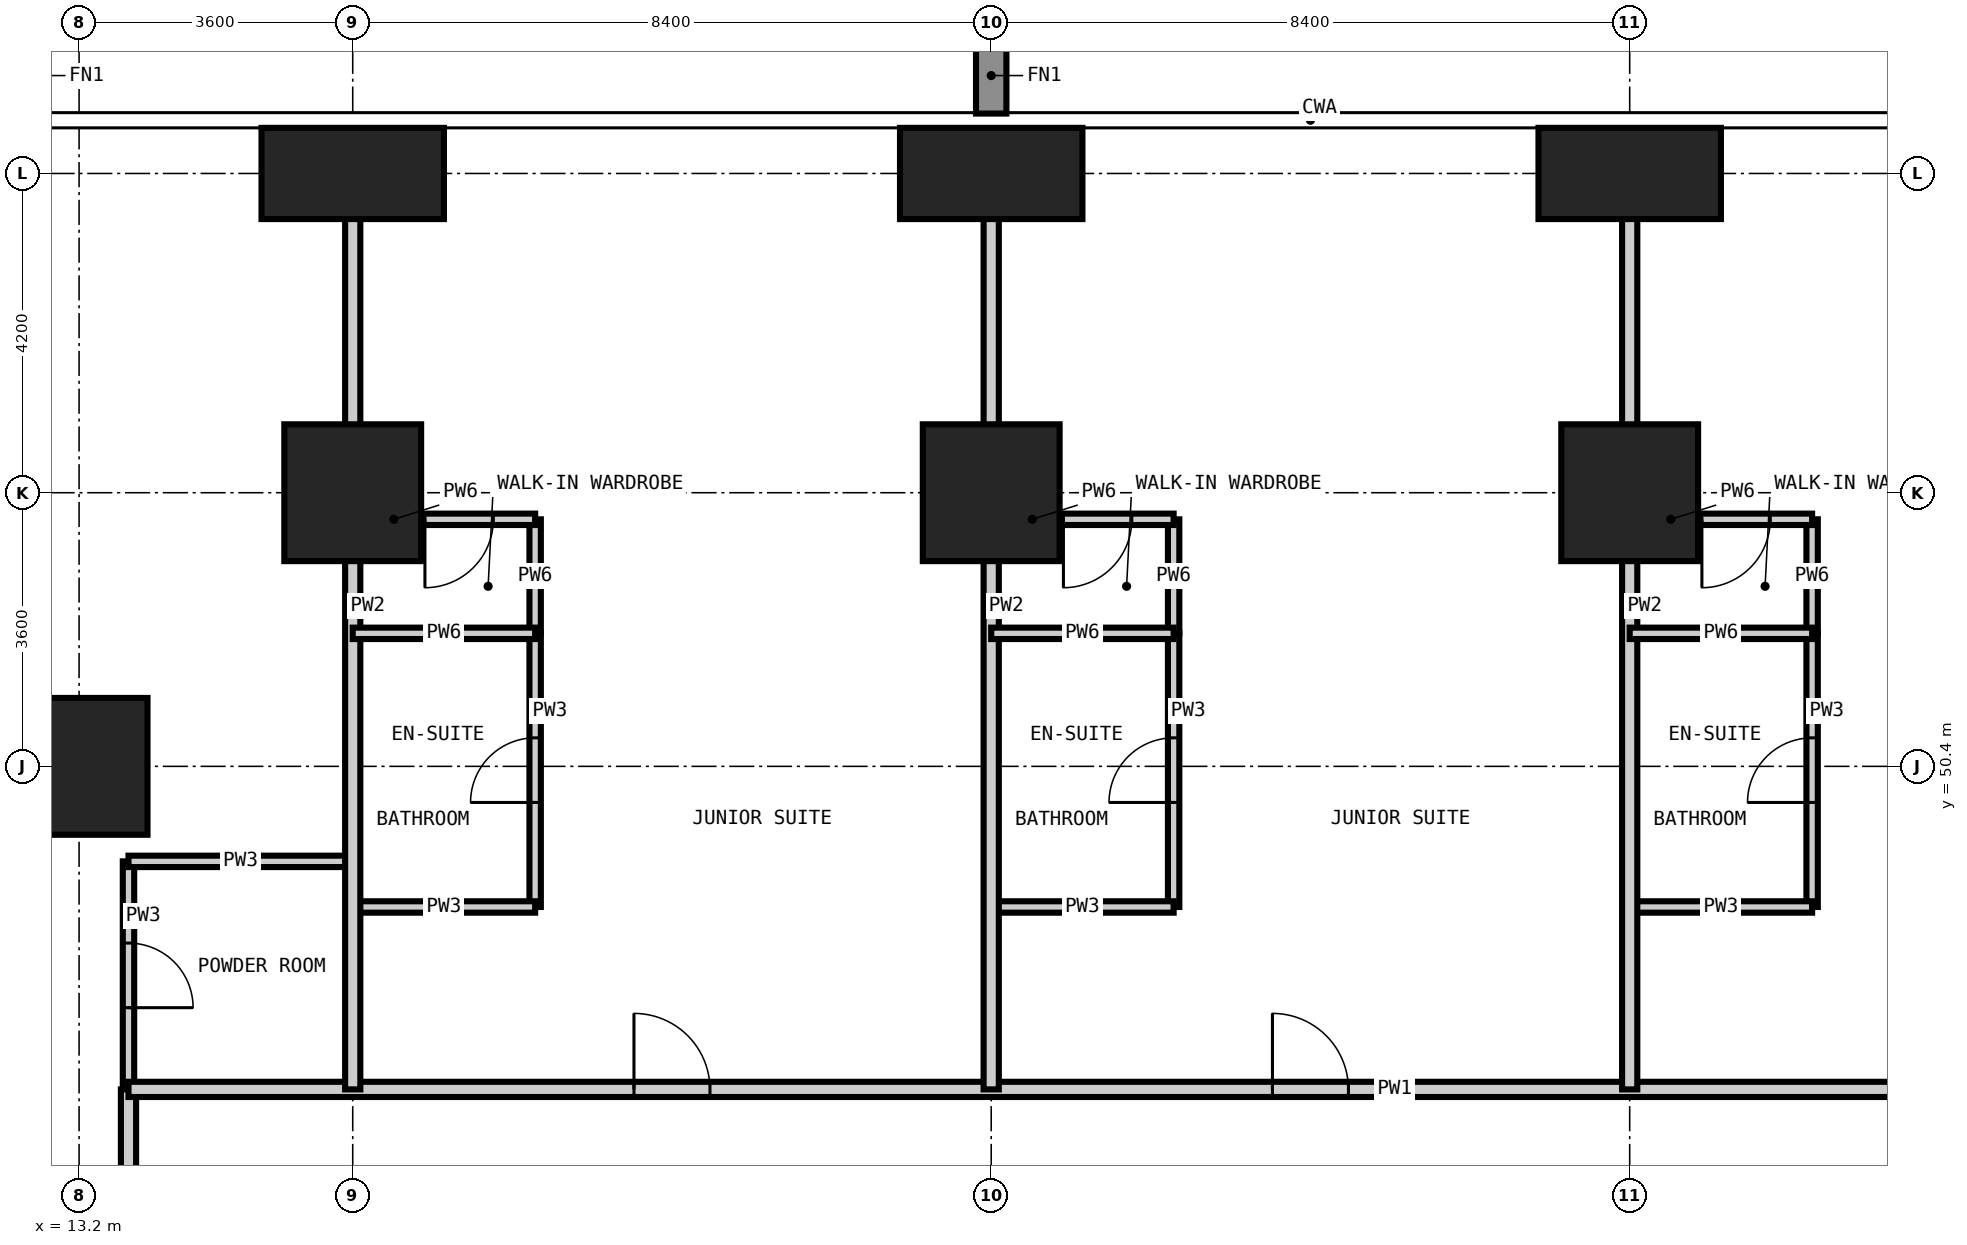
"""IFC4 building model, lengths in metres.
Left out: names, types, materials, properties, quantities, classifications, styles, units other than length and angle.
Written with IfcOpenShell. Run it as: python <this file> out.ifc"""

import sys

from ifc_helpers import new_model, si_unit, direction, frame, frame_2d, origin, origin_2d, place, context, subcontext, project, spatial, rectangle, extrude, element, fill, save


model = new_model("IFC4")
c1 = context("Model", 3, precision=1e-05, world=origin(), true_north=direction((0.0, 1.0)))
c2 = subcontext(c1, "Body", "Model", "MODEL_VIEW")
j1 = project(units=[si_unit("LENGTHUNIT", "METRE"), si_unit("PLANEANGLEUNIT", "RADIAN")], contexts=[c1])
p1 = place(None, origin())
s1 = spatial("IfcSite", under=j1, at=p1, CompositionType="ELEMENT")
p2 = place(p1, origin())
s2 = spatial("IfcBuilding", under=s1, at=p2, CompositionType="ELEMENT")
p3 = place(p2, frame((0.0, 0.0, 55.8)))
s3 = spatial("IfcBuildingStorey", under=s2, at=p3, CompositionType="ELEMENT", Elevation=55.8)
for number, where, z_axis, x_axis in (
    (1, (13.2, 50.4, -0.35), (0.0, 0.0, 1.0), (1.0, 0.0, 0.0)),
    (2, (16.8, 54.0, -0.35), (0.0, 0.0, 1.0), (1.0, 0.0, 0.0)),
):
    element("IfcColumn", number, at=place(p3, frame(where, z_axis=z_axis, x_axis=x_axis)), inside=s3, PredefinedType="COLUMN", context=c2, shape_type="SweptSolid", body=[
        extrude(rectangle(XDim=1.8, YDim=1.8, at=origin_2d()), origin(), (0.0, 0.0, 1.0), 3.6),
    ])
p4 = place(p3, frame((16.8, 58.2, -0.35), z_axis=(0.0, 0.0, 1.0), x_axis=(1.0, 0.0, 0.0)))
e3 = element("IfcColumn", 3, at=p4, inside=s3, PredefinedType="COLUMN", context=c2, shape_type="SweptSolid", body=[
    extrude(rectangle(XDim=2.4, YDim=1.2, at=origin_2d()), origin(), (0.0, 0.0, 1.0), 3.6),
])
p5 = place(p3, frame((25.2, 54.0, -0.35), z_axis=(0.0, 0.0, 1.0), x_axis=(1.0, 0.0, 0.0)))
e4 = element("IfcColumn", 4, at=p5, inside=s3, PredefinedType="COLUMN", context=c2, shape_type="SweptSolid", body=[
    extrude(rectangle(XDim=1.8, YDim=1.8, at=origin_2d()), origin(), (0.0, 0.0, 1.0), 3.6),
])
p6 = place(p3, frame((25.2, 58.2, -0.35), z_axis=(0.0, 0.0, 1.0), x_axis=(1.0, 0.0, 0.0)))
e5 = element("IfcColumn", 5, at=p6, inside=s3, PredefinedType="COLUMN", context=c2, shape_type="SweptSolid", body=[
    extrude(rectangle(XDim=2.4, YDim=1.2, at=origin_2d()), origin(), (0.0, 0.0, 1.0), 3.6),
])
p7 = place(p3, frame((33.6, 54.0, -0.35), z_axis=(0.0, 0.0, 1.0), x_axis=(1.0, 0.0, 0.0)))
e6 = element("IfcColumn", 6, at=p7, inside=s3, PredefinedType="COLUMN", context=c2, shape_type="SweptSolid", body=[
    extrude(rectangle(XDim=1.8, YDim=1.8, at=origin_2d()), origin(), (0.0, 0.0, 1.0), 3.6),
])
p8 = place(p3, frame((33.6, 58.2, -0.35), z_axis=(0.0, 0.0, 1.0), x_axis=(1.0, 0.0, 0.0)))
e7 = element("IfcColumn", 7, at=p8, inside=s3, PredefinedType="COLUMN", context=c2, shape_type="SweptSolid", body=[
    extrude(rectangle(XDim=2.4, YDim=1.2, at=origin_2d()), origin(), (0.0, 0.0, 1.0), 3.6),
])
p9 = place(p3, frame((13.85, 46.15, 0.0), z_axis=(0.0, 0.0, 1.0), x_axis=(0.0, 1.0, 0.0)))
e8 = element("IfcWall", 8, at=p9, inside=s3, PredefinedType="PARTITIONING", context=c2, shape_type="SweptSolid", body=[
    extrude(rectangle(XDim=3.0, YDim=0.15, at=frame_2d((1.5, 0.0))), origin(), (0.0, 0.0, 1.0), 3.25),
])
p10 = place(p9, frame((1.075, 0.0, 0.0)))
e9 = element("IfcOpeningElement", 9, at=p10, cuts=e8, PredefinedType="OPENING", context=c2, shape_type="SweptSolid", body=[
    extrude(rectangle(XDim=0.85, YDim=2.1, at=frame_2d((0.425, 1.05))), frame((0.0, 0.085, 0.0), z_axis=(0.0, -1.0, 0.0), x_axis=(1.0, 0.0, 0.0)), (0.0, 0.0, 1.0), 0.17),
])
p11 = place(p3, frame((19.2, 48.55, 0.0), z_axis=(0.0, 0.0, 1.0), x_axis=(0.0, 1.0, 0.0)))
e10 = element("IfcWall", 10, at=p11, inside=s3, PredefinedType="PARTITIONING", context=c2, shape_type="SweptSolid", body=[
    extrude(rectangle(XDim=3.6, YDim=0.15, at=frame_2d((1.8, 0.0))), origin(), (0.0, 0.0, 1.0), 3.25),
])
p12 = place(p11, frame((1.375, 0.0, 0.0)))
e11 = element("IfcOpeningElement", 11, at=p12, cuts=e10, PredefinedType="OPENING", context=c2, shape_type="SweptSolid", body=[
    extrude(rectangle(XDim=0.85, YDim=2.1, at=frame_2d((0.425, 1.05))), frame((0.0, 0.085, 0.0), z_axis=(0.0, -1.0, 0.0), x_axis=(1.0, 0.0, 0.0)), (0.0, 0.0, 1.0), 0.17),
])
p13 = place(p3, frame((27.6, 48.55, 0.0), z_axis=(0.0, 0.0, 1.0), x_axis=(0.0, 1.0, 0.0)))
e12 = element("IfcWall", 12, at=p13, inside=s3, PredefinedType="PARTITIONING", context=c2, shape_type="SweptSolid", body=[
    extrude(rectangle(XDim=3.6, YDim=0.15, at=frame_2d((1.8, 0.0))), origin(), (0.0, 0.0, 1.0), 3.25),
])
p14 = place(p13, frame((1.375, 0.0, 0.0)))
e13 = element("IfcOpeningElement", 13, at=p14, cuts=e12, PredefinedType="OPENING", context=c2, shape_type="SweptSolid", body=[
    extrude(rectangle(XDim=0.85, YDim=2.1, at=frame_2d((0.425, 1.05))), frame((0.0, 0.085, 0.0), z_axis=(0.0, -1.0, 0.0), x_axis=(1.0, 0.0, 0.0)), (0.0, 0.0, 1.0), 0.17),
])
p15 = place(p3, frame((36.0, 48.55, 0.0), z_axis=(0.0, 0.0, 1.0), x_axis=(0.0, 1.0, 0.0)))
e14 = element("IfcWall", 14, at=p15, inside=s3, PredefinedType="PARTITIONING", context=c2, shape_type="SweptSolid", body=[
    extrude(rectangle(XDim=3.6, YDim=0.15, at=frame_2d((1.8, 0.0))), origin(), (0.0, 0.0, 1.0), 3.25),
])
p16 = place(p15, frame((1.375, 0.0, 0.0)))
e15 = element("IfcOpeningElement", 15, at=p16, cuts=e14, PredefinedType="OPENING", context=c2, shape_type="SweptSolid", body=[
    extrude(rectangle(XDim=0.85, YDim=2.1, at=frame_2d((0.425, 1.05))), frame((0.0, 0.085, 0.0), z_axis=(0.0, -1.0, 0.0), x_axis=(1.0, 0.0, 0.0)), (0.0, 0.0, 1.0), 0.17),
])
p17 = place(p3, frame((16.8, 48.55, 0.0), z_axis=(0.0, 0.0, 1.0), x_axis=(1.0, 0.0, 0.0)))
e16 = element("IfcWall", 16, at=p17, inside=s3, PredefinedType="PARTITIONING", context=c2, shape_type="SweptSolid", body=[
    extrude(rectangle(XDim=2.4, YDim=0.15, at=frame_2d((1.2, 0.0))), origin(), (0.0, 0.0, 1.0), 3.25),
])
p18 = place(p3, frame((25.2, 48.55, 0.0), z_axis=(0.0, 0.0, 1.0), x_axis=(1.0, 0.0, 0.0)))
e17 = element("IfcWall", 17, at=p18, inside=s3, PredefinedType="PARTITIONING", context=c2, shape_type="SweptSolid", body=[
    extrude(rectangle(XDim=2.4, YDim=0.15, at=frame_2d((1.2, 0.0))), origin(), (0.0, 0.0, 1.0), 3.25),
])
p19 = place(p3, frame((33.6, 48.55, 0.0), z_axis=(0.0, 0.0, 1.0), x_axis=(1.0, 0.0, 0.0)))
e18 = element("IfcWall", 18, at=p19, inside=s3, PredefinedType="PARTITIONING", context=c2, shape_type="SweptSolid", body=[
    extrude(rectangle(XDim=2.4, YDim=0.15, at=frame_2d((1.2, 0.0))), origin(), (0.0, 0.0, 1.0), 3.25),
])
p20 = place(p3, frame((13.85, 49.15, 0.0), z_axis=(0.0, 0.0, 1.0), x_axis=(1.0, 0.0, 0.0)))
e19 = element("IfcWall", 19, at=p20, inside=s3, PredefinedType="PARTITIONING", context=c2, shape_type="SweptSolid", body=[
    extrude(rectangle(XDim=2.95, YDim=0.15, at=frame_2d((1.475, 0.0))), origin(), (0.0, 0.0, 1.0), 3.25),
])
p21 = place(p3, frame((13.85, 13.85, 0.0), z_axis=(0.0, 0.0, 1.0), x_axis=(0.0, 1.0, 0.0)))
e20 = element("IfcWall", 20, at=p21, inside=s3, PredefinedType="PARTITIONING", context=c2, shape_type="SweptSolid", body=[
    extrude(rectangle(XDim=32.3, YDim=0.2, at=frame_2d((16.15, 0.0))), origin(), (0.0, 0.0, 1.0), 3.25),
])
p22 = place(p21, frame((5.45, 0.0, 0.0)))
e21 = element("IfcOpeningElement", 21, at=p22, cuts=e20, PredefinedType="OPENING", context=c2, shape_type="SweptSolid", body=[
    extrude(rectangle(XDim=1.0, YDim=2.2, at=frame_2d((0.5, 1.1))), frame((0.0, 0.11, 0.0), z_axis=(0.0, -1.0, 0.0), x_axis=(1.0, 0.0, 0.0)), (0.0, 0.0, 1.0), 0.22),
])
p23 = place(p21, frame((13.85, 0.0, 0.0)))
e22 = element("IfcOpeningElement", 22, at=p23, cuts=e20, PredefinedType="OPENING", context=c2, shape_type="SweptSolid", body=[
    extrude(rectangle(XDim=1.0, YDim=2.2, at=frame_2d((0.5, 1.1))), frame((0.0, 0.11, 0.0), z_axis=(0.0, -1.0, 0.0), x_axis=(1.0, 0.0, 0.0)), (0.0, 0.0, 1.0), 0.22),
])
p24 = place(p21, frame((22.25, 0.0, 0.0)))
e23 = element("IfcOpeningElement", 23, at=p24, cuts=e20, PredefinedType="OPENING", context=c2, shape_type="SweptSolid", body=[
    extrude(rectangle(XDim=1.0, YDim=2.2, at=frame_2d((0.5, 1.1))), frame((0.0, 0.11, 0.0), z_axis=(0.0, -1.0, 0.0), x_axis=(1.0, 0.0, 0.0)), (0.0, 0.0, 1.0), 0.22),
])
p25 = place(p21, frame((0.975, 0.0, 0.0)))
e24 = element("IfcOpeningElement", 24, at=p25, cuts=e20, PredefinedType="OPENING", context=c2, shape_type="SweptSolid", body=[
    extrude(rectangle(XDim=1.0, YDim=2.2, at=frame_2d((0.5, 1.1))), frame((0.0, 0.11, 0.0), z_axis=(0.0, -1.0, 0.0), x_axis=(1.0, 0.0, 0.0)), (0.0, 0.0, 1.0), 0.22),
])
p26 = place(p21, frame((29.725, 0.0, 0.0)))
e25 = element("IfcOpeningElement", 25, at=p26, cuts=e20, PredefinedType="OPENING", context=c2, shape_type="SweptSolid", body=[
    extrude(rectangle(XDim=1.0, YDim=2.2, at=frame_2d((0.5, 1.1))), frame((0.0, 0.11, 0.0), z_axis=(0.0, -1.0, 0.0), x_axis=(1.0, 0.0, 0.0)), (0.0, 0.0, 1.0), 0.22),
])
p27 = place(p3, frame((13.85, 46.15, 0.0), z_axis=(0.0, 0.0, 1.0), x_axis=(1.0, 0.0, 0.0)))
e26 = element("IfcWall", 26, at=p27, inside=s3, PredefinedType="PARTITIONING", context=c2, shape_type="SweptSolid", body=[
    extrude(rectangle(XDim=31.7, YDim=0.2, at=frame_2d((15.85, 0.0))), origin(), (0.0, 0.0, 1.0), 3.25),
])
p28 = place(p27, frame((6.65, 0.0, 0.0)))
e27 = element("IfcOpeningElement", 27, at=p28, cuts=e26, PredefinedType="OPENING", context=c2, shape_type="SweptSolid", body=[
    extrude(rectangle(XDim=1.0, YDim=2.2, at=frame_2d((0.5, 1.1))), frame((0.0, 0.11, 0.0), z_axis=(0.0, -1.0, 0.0), x_axis=(1.0, 0.0, 0.0)), (0.0, 0.0, 1.0), 0.22),
])
p29 = place(p27, frame((15.05, 0.0, 0.0)))
e28 = element("IfcOpeningElement", 28, at=p29, cuts=e26, PredefinedType="OPENING", context=c2, shape_type="SweptSolid", body=[
    extrude(rectangle(XDim=1.0, YDim=2.2, at=frame_2d((0.5, 1.1))), frame((0.0, 0.11, 0.0), z_axis=(0.0, -1.0, 0.0), x_axis=(1.0, 0.0, 0.0)), (0.0, 0.0, 1.0), 0.22),
])
p30 = place(p27, frame((23.45, 0.0, 0.0)))
e29 = element("IfcOpeningElement", 29, at=p30, cuts=e26, PredefinedType="OPENING", context=c2, shape_type="SweptSolid", body=[
    extrude(rectangle(XDim=1.0, YDim=2.2, at=frame_2d((0.5, 1.1))), frame((0.0, 0.11, 0.0), z_axis=(0.0, -1.0, 0.0), x_axis=(1.0, 0.0, 0.0)), (0.0, 0.0, 1.0), 0.22),
])
for number, where, z_axis, x_axis in (
    (30, (16.8, 46.15, 0.0), (0.0, 0.0, 1.0), (0.0, 1.0, 0.0)),
    (31, (25.2, 46.15, 0.0), (0.0, 0.0, 1.0), (0.0, 1.0, 0.0)),
    (32, (33.6, 46.15, 0.0), (0.0, 0.0, 1.0), (0.0, 1.0, 0.0)),
):
    element("IfcWall", number, at=place(p3, frame(where, z_axis=z_axis, x_axis=x_axis)), inside=s3, PredefinedType="PARTITIONING", context=c2, shape_type="SweptSolid", body=[
        extrude(rectangle(XDim=12.658, YDim=0.2, at=frame_2d((6.329, 0.0))), origin(), (0.0, 0.0, 1.0), 3.25),
    ])
for number, where, z_axis, x_axis in (
    (33, (19.2, 52.15, 0.0), (0.0, 0.0, 1.0), (0.0, 1.0, 0.0)),
    (34, (27.6, 52.15, 0.0), (0.0, 0.0, 1.0), (0.0, 1.0, 0.0)),
    (35, (36.0, 52.15, 0.0), (0.0, 0.0, 1.0), (0.0, 1.0, 0.0)),
):
    element("IfcWall", number, at=place(p3, frame(where, z_axis=z_axis, x_axis=x_axis)), inside=s3, PredefinedType="PARTITIONING", context=c2, shape_type="SweptSolid", body=[
        extrude(rectangle(XDim=1.5, YDim=0.15, at=frame_2d((0.75, 0.0))), origin(), (0.0, 0.0, 1.0), 3.25),
    ])
p31 = place(p3, frame((16.8, 52.15, 0.0), z_axis=(0.0, 0.0, 1.0), x_axis=(1.0, 0.0, 0.0)))
e36 = element("IfcWall", 36, at=p31, inside=s3, PredefinedType="PARTITIONING", context=c2, shape_type="SweptSolid", body=[
    extrude(rectangle(XDim=2.4, YDim=0.15, at=frame_2d((1.2, 0.0))), origin(), (0.0, 0.0, 1.0), 3.25),
])
p32 = place(p3, frame((25.2, 52.15, 0.0), z_axis=(0.0, 0.0, 1.0), x_axis=(1.0, 0.0, 0.0)))
e37 = element("IfcWall", 37, at=p32, inside=s3, PredefinedType="PARTITIONING", context=c2, shape_type="SweptSolid", body=[
    extrude(rectangle(XDim=2.4, YDim=0.15, at=frame_2d((1.2, 0.0))), origin(), (0.0, 0.0, 1.0), 3.25),
])
p33 = place(p3, frame((33.6, 52.15, 0.0), z_axis=(0.0, 0.0, 1.0), x_axis=(1.0, 0.0, 0.0)))
e38 = element("IfcWall", 38, at=p33, inside=s3, PredefinedType="PARTITIONING", context=c2, shape_type="SweptSolid", body=[
    extrude(rectangle(XDim=2.4, YDim=0.15, at=frame_2d((1.2, 0.0))), origin(), (0.0, 0.0, 1.0), 3.25),
])
p34 = place(p3, frame((16.8, 53.65, 0.0), z_axis=(0.0, 0.0, 1.0), x_axis=(1.0, 0.0, 0.0)))
e39 = element("IfcWall", 39, at=p34, inside=s3, PredefinedType="PARTITIONING", context=c2, shape_type="SweptSolid", body=[
    extrude(rectangle(XDim=2.4, YDim=0.15, at=frame_2d((1.2, 0.0))), origin(), (0.0, 0.0, 1.0), 3.25),
])
p35 = place(p34, frame((0.95, 0.0, 0.0)))
e40 = element("IfcOpeningElement", 40, at=p35, cuts=e39, PredefinedType="OPENING", context=c2, shape_type="SweptSolid", body=[
    extrude(rectangle(XDim=0.9, YDim=2.1, at=frame_2d((0.45, 1.05))), frame((0.0, 0.085, 0.0), z_axis=(0.0, -1.0, 0.0), x_axis=(1.0, 0.0, 0.0)), (0.0, 0.0, 1.0), 0.17),
])
p36 = place(p3, frame((25.2, 53.65, 0.0), z_axis=(0.0, 0.0, 1.0), x_axis=(1.0, 0.0, 0.0)))
e41 = element("IfcWall", 41, at=p36, inside=s3, PredefinedType="PARTITIONING", context=c2, shape_type="SweptSolid", body=[
    extrude(rectangle(XDim=2.4, YDim=0.15, at=frame_2d((1.2, 0.0))), origin(), (0.0, 0.0, 1.0), 3.25),
])
p37 = place(p36, frame((0.95, 0.0, 0.0)))
e42 = element("IfcOpeningElement", 42, at=p37, cuts=e41, PredefinedType="OPENING", context=c2, shape_type="SweptSolid", body=[
    extrude(rectangle(XDim=0.9, YDim=2.1, at=frame_2d((0.45, 1.05))), frame((0.0, 0.085, 0.0), z_axis=(0.0, -1.0, 0.0), x_axis=(1.0, 0.0, 0.0)), (0.0, 0.0, 1.0), 0.17),
])
p38 = place(p3, frame((33.6, 53.65, 0.0), z_axis=(0.0, 0.0, 1.0), x_axis=(1.0, 0.0, 0.0)))
e43 = element("IfcWall", 43, at=p38, inside=s3, PredefinedType="PARTITIONING", context=c2, shape_type="SweptSolid", body=[
    extrude(rectangle(XDim=2.4, YDim=0.15, at=frame_2d((1.2, 0.0))), origin(), (0.0, 0.0, 1.0), 3.25),
])
p39 = place(p38, frame((0.95, 0.0, 0.0)))
e44 = element("IfcOpeningElement", 44, at=p39, cuts=e43, PredefinedType="OPENING", context=c2, shape_type="SweptSolid", body=[
    extrude(rectangle(XDim=0.9, YDim=2.1, at=frame_2d((0.45, 1.05))), frame((0.0, 0.085, 0.0), z_axis=(0.0, -1.0, 0.0), x_axis=(1.0, 0.0, 0.0)), (0.0, 0.0, 1.0), 0.17),
])
p40 = place(p28, origin())
e45 = element("IfcDoor", 45, at=p40, inside=s3, OperationType="SINGLE_SWING_LEFT", PredefinedType="DOOR", context=c2, shape_type="SweptSolid", body=[
    extrude(rectangle(XDim=1.0, YDim=2.2, at=frame_2d((0.5, 1.1))), frame((0.0, 0.025, 0.0), z_axis=(0.0, -1.0, 0.0), x_axis=(1.0, 0.0, 0.0)), (0.0, 0.0, 1.0), 0.05),
])
fill(e27, e45)
p41 = place(p12, origin())
e46 = element("IfcDoor", 46, at=p41, inside=s3, OperationType="SINGLE_SWING_LEFT", PredefinedType="DOOR", context=c2, shape_type="SweptSolid", body=[
    extrude(rectangle(XDim=0.85, YDim=2.1, at=frame_2d((0.425, 1.05))), frame((0.0, 0.025, 0.0), z_axis=(0.0, -1.0, 0.0), x_axis=(1.0, 0.0, 0.0)), (0.0, 0.0, 1.0), 0.05),
])
fill(e11, e46)
p42 = place(p35, frame((0.9, 0.0, 0.0), z_axis=(0.0, 0.0, 1.0), x_axis=(-1.0, 0.0, 0.0)))
e47 = element("IfcDoor", 47, at=p42, inside=s3, OperationType="SINGLE_SWING_RIGHT", PredefinedType="DOOR", context=c2, shape_type="SweptSolid", body=[
    extrude(rectangle(XDim=0.9, YDim=2.1, at=frame_2d((0.45, 1.05))), frame((0.0, 0.025, 0.0), z_axis=(0.0, -1.0, 0.0), x_axis=(1.0, 0.0, 0.0)), (0.0, 0.0, 1.0), 0.05),
])
fill(e40, e47)
p43 = place(p29, origin())
e48 = element("IfcDoor", 48, at=p43, inside=s3, OperationType="SINGLE_SWING_LEFT", PredefinedType="DOOR", context=c2, shape_type="SweptSolid", body=[
    extrude(rectangle(XDim=1.0, YDim=2.2, at=frame_2d((0.5, 1.1))), frame((0.0, 0.025, 0.0), z_axis=(0.0, -1.0, 0.0), x_axis=(1.0, 0.0, 0.0)), (0.0, 0.0, 1.0), 0.05),
])
fill(e28, e48)
p44 = place(p14, origin())
e49 = element("IfcDoor", 49, at=p44, inside=s3, OperationType="SINGLE_SWING_LEFT", PredefinedType="DOOR", context=c2, shape_type="SweptSolid", body=[
    extrude(rectangle(XDim=0.85, YDim=2.1, at=frame_2d((0.425, 1.05))), frame((0.0, 0.025, 0.0), z_axis=(0.0, -1.0, 0.0), x_axis=(1.0, 0.0, 0.0)), (0.0, 0.0, 1.0), 0.05),
])
fill(e13, e49)
p45 = place(p37, frame((0.9, 0.0, 0.0), z_axis=(0.0, 0.0, 1.0), x_axis=(-1.0, 0.0, 0.0)))
e50 = element("IfcDoor", 50, at=p45, inside=s3, OperationType="SINGLE_SWING_RIGHT", PredefinedType="DOOR", context=c2, shape_type="SweptSolid", body=[
    extrude(rectangle(XDim=0.9, YDim=2.1, at=frame_2d((0.45, 1.05))), frame((0.0, 0.025, 0.0), z_axis=(0.0, -1.0, 0.0), x_axis=(1.0, 0.0, 0.0)), (0.0, 0.0, 1.0), 0.05),
])
fill(e42, e50)
p46 = place(p16, origin())
e51 = element("IfcDoor", 51, at=p46, inside=s3, OperationType="SINGLE_SWING_LEFT", PredefinedType="DOOR", context=c2, shape_type="SweptSolid", body=[
    extrude(rectangle(XDim=0.85, YDim=2.1, at=frame_2d((0.425, 1.05))), frame((0.0, 0.025, 0.0), z_axis=(0.0, -1.0, 0.0), x_axis=(1.0, 0.0, 0.0)), (0.0, 0.0, 1.0), 0.05),
])
fill(e15, e51)
p47 = place(p39, frame((0.9, 0.0, 0.0), z_axis=(0.0, 0.0, 1.0), x_axis=(-1.0, 0.0, 0.0)))
e52 = element("IfcDoor", 52, at=p47, inside=s3, OperationType="SINGLE_SWING_RIGHT", PredefinedType="DOOR", context=c2, shape_type="SweptSolid", body=[
    extrude(rectangle(XDim=0.9, YDim=2.1, at=frame_2d((0.45, 1.05))), frame((0.0, 0.025, 0.0), z_axis=(0.0, -1.0, 0.0), x_axis=(1.0, 0.0, 0.0)), (0.0, 0.0, 1.0), 0.05),
])
fill(e44, e52)
p48 = place(p10, frame((0.85, 0.0, 0.0), z_axis=(0.0, 0.0, 1.0), x_axis=(-1.0, 0.0, 0.0)))
e53 = element("IfcDoor", 53, at=p48, inside=s3, OperationType="SINGLE_SWING_RIGHT", PredefinedType="DOOR", context=c2, shape_type="SweptSolid", body=[
    extrude(rectangle(XDim=0.85, YDim=2.1, at=frame_2d((0.425, 1.05))), frame((0.0, 0.025, 0.0), z_axis=(0.0, -1.0, 0.0), x_axis=(1.0, 0.0, 0.0)), (0.0, 0.0, 1.0), 0.05),
])
fill(e9, e53)
save(model, sys.argv[1])
